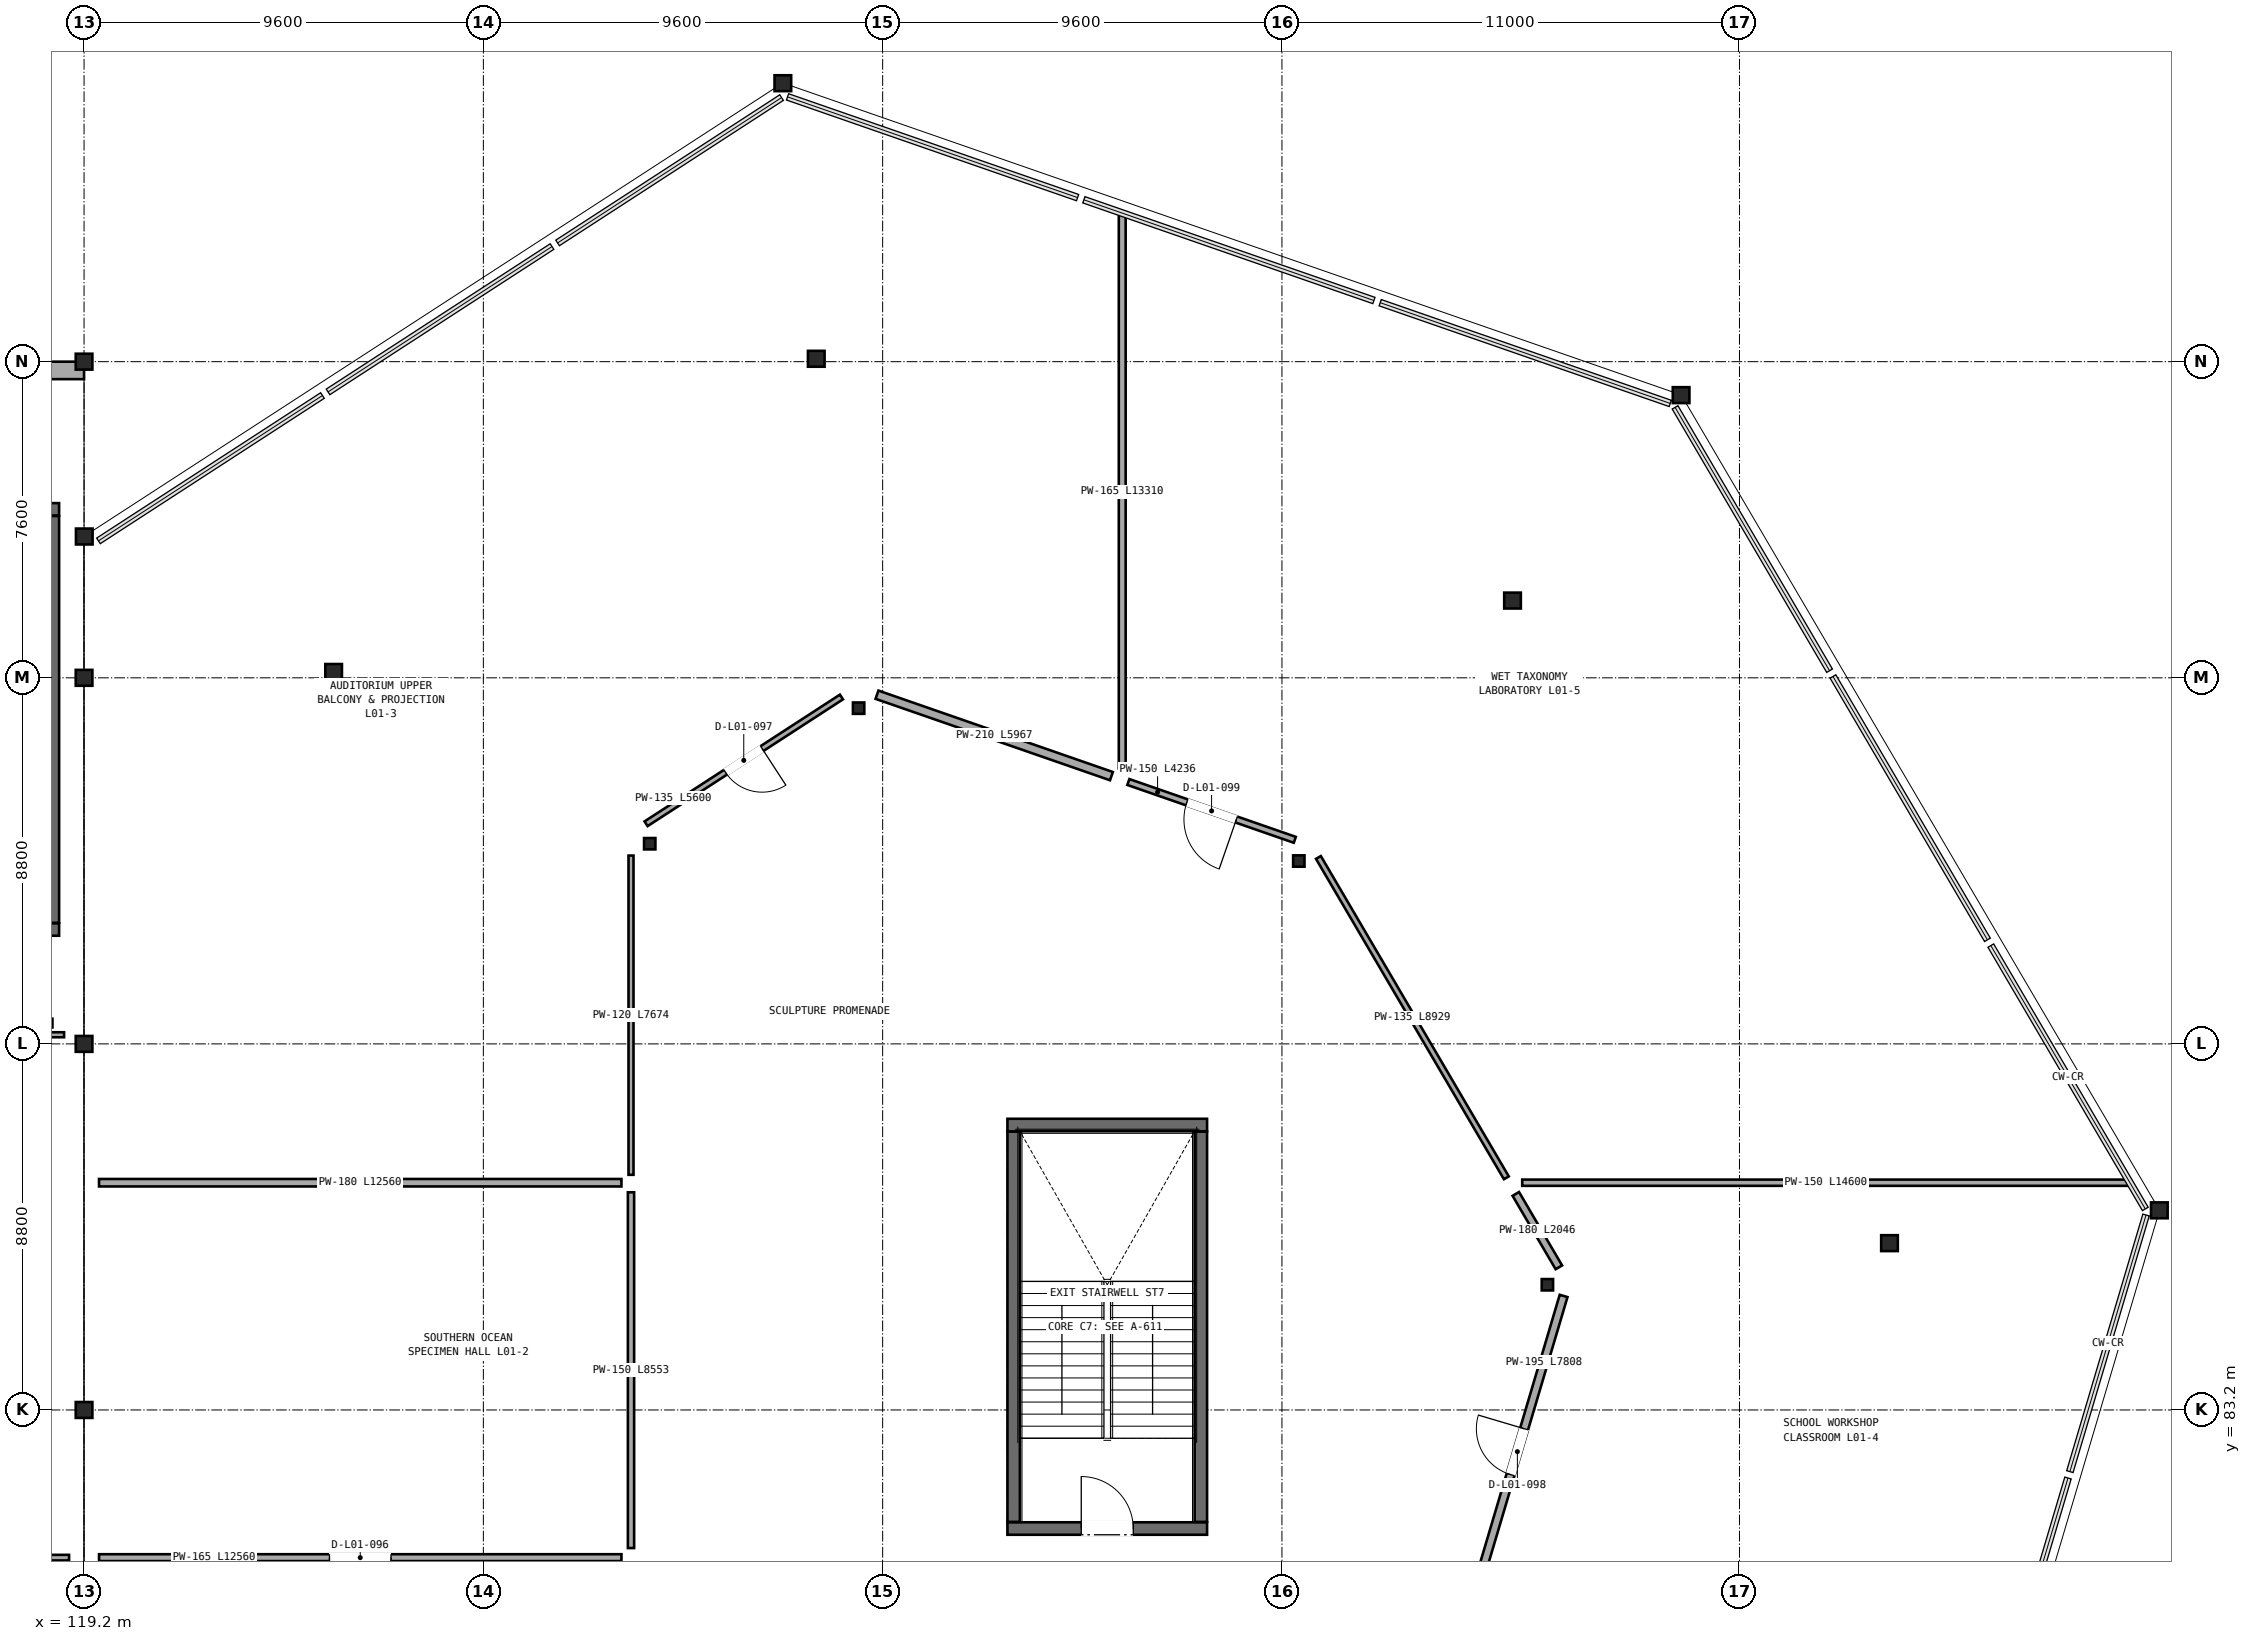
"""IFC4 building model, lengths in metres.
Left out: names, types, materials, properties, quantities, classifications, styles, units other than length and angle.
Written with IfcOpenShell. Run it as: python <this file> out.ifc"""

import sys

from ifc_helpers import new_model, si_unit, direction, frame, frame_2d, origin, origin_2d, place, context, subcontext, project, spatial, rectangle, hollow_circle, i_section, extrude, element, fill, save


model = new_model("IFC4")
c1 = context("Model", 3, precision=1e-05, world=origin(), true_north=direction((0.0, 1.0)))
c2 = subcontext(c1, "Body", "Model", "MODEL_VIEW")
j1 = project(units=[si_unit("LENGTHUNIT", "METRE"), si_unit("PLANEANGLEUNIT", "RADIAN")], contexts=[c1])
p1 = place(None, origin())
s1 = spatial("IfcSite", under=j1, at=p1, CompositionType="ELEMENT")
p2 = place(p1, origin())
s2 = spatial("IfcBuilding", under=s1, at=p2, CompositionType="ELEMENT")
p3 = place(p2, frame((0.0, 0.0, 5.6)))
s3 = spatial("IfcBuildingStorey", under=s2, at=p3, CompositionType="ELEMENT", Elevation=5.6)
for number, where, z_axis, x_axis in (
    (1, (119.2, 83.2, 0.0), (0.0, 0.0, 1.0), (1.0, 0.0, 0.0)),
    (2, (119.2, 92.0, 0.0), (0.0, 0.0, 1.0), (1.0, 0.0, 0.0)),
    (3, (119.2, 100.8, 0.0), (0.0, 0.0, 1.0), (1.0, 0.0, 0.0)),
    (4, (119.2, 108.4, 0.0), (0.0, 0.0, 1.0), (1.0, 0.0, 0.0)),
):
    element("IfcColumn", number, at=place(p3, frame(where, z_axis=z_axis, x_axis=x_axis)), inside=s3, PredefinedType="COLUMN", context=c2, shape_type="SweptSolid", body=[
        extrude(i_section(OverallWidth=0.4, OverallDepth=0.382, WebThickness=0.025, FlangeThickness=0.036, at=origin_2d()), origin(), (0.0, 0.0, 1.0), 4.5),
    ])
p4 = place(p3, frame((169.094, 87.999, 0.04), z_axis=(-0.140983406199, -0.017121735726, 0.989863892332), x_axis=(0.120559238504, -0.992706134771, 0.0)))
e5 = element("IfcColumn", 5, at=p4, inside=s3, PredefinedType="COLUMN", context=c2, shape_type="SweptSolid", body=[
    extrude(i_section(OverallWidth=0.4, OverallDepth=0.382, WebThickness=0.025, FlangeThickness=0.036, at=origin_2d()), origin(), (0.0, 0.0, 1.0), 4.506),
])
p5 = place(p3, frame((162.607, 87.21, 0.0), z_axis=(0.0, 0.0, 1.0), x_axis=(1.0, 0.0, 0.0)))
e6 = element("IfcColumn", 6, at=p5, inside=s3, PredefinedType="COLUMN", context=c2, shape_type="SweptSolid", body=[
    extrude(i_section(OverallWidth=0.4, OverallDepth=0.382, WebThickness=0.025, FlangeThickness=0.036, at=origin_2d()), origin(), (0.0, 0.0, 1.0), 4.5),
])
p6 = place(p3, frame((154.382, 86.21, 0.0), z_axis=(0.0, 0.0, 1.0), x_axis=(1.0, 0.0, 0.0)))
e7 = element("IfcColumn", 7, at=p6, inside=s3, PredefinedType="COLUMN", context=c2, shape_type="SweptSolid", body=[
    extrude(hollow_circle(Radius=0.136, WallThickness=0.009, at=origin_2d()), origin(), (0.0, 0.0, 1.0), 4.5),
])
p7 = place(p3, frame((157.596, 107.596, 0.04), z_axis=(-0.088140167432, -0.10738356192, 0.990303025096), x_axis=(0.772965424746, -0.634448147722, 0.0)))
e8 = element("IfcColumn", 8, at=p7, inside=s3, PredefinedType="COLUMN", context=c2, shape_type="SweptSolid", body=[
    extrude(i_section(OverallWidth=0.4, OverallDepth=0.382, WebThickness=0.025, FlangeThickness=0.036, at=origin_2d()), origin(), (0.0, 0.0, 1.0), 4.504),
])
p8 = place(p3, frame((153.544, 102.657, 0.0), z_axis=(0.0, 0.0, 1.0), x_axis=(1.0, 0.0, 0.0)))
e9 = element("IfcColumn", 9, at=p8, inside=s3, PredefinedType="COLUMN", context=c2, shape_type="SweptSolid", body=[
    extrude(i_section(OverallWidth=0.4, OverallDepth=0.382, WebThickness=0.025, FlangeThickness=0.036, at=origin_2d()), origin(), (0.0, 0.0, 1.0), 4.5),
])
p9 = place(p3, frame((148.406, 96.396, 0.0), z_axis=(0.0, 0.0, 1.0), x_axis=(1.0, 0.0, 0.0)))
e10 = element("IfcColumn", 10, at=p9, inside=s3, PredefinedType="COLUMN", context=c2, shape_type="SweptSolid", body=[
    extrude(hollow_circle(Radius=0.136, WallThickness=0.009, at=origin_2d()), origin(), (0.0, 0.0, 1.0), 4.5),
])
p10 = place(p3, frame((136.001, 115.094, 0.04), z_axis=(0.017439331242, -0.14390156245, 0.989438330595), x_axis=(0.992736486801, 0.120309051091, 0.0)))
e11 = element("IfcColumn", 11, at=p10, inside=s3, PredefinedType="COLUMN", context=c2, shape_type="SweptSolid", body=[
    extrude(i_section(OverallWidth=0.4, OverallDepth=0.382, WebThickness=0.025, FlangeThickness=0.036, at=origin_2d()), origin(), (0.0, 0.0, 1.0), 4.508),
])
p11 = place(p3, frame((136.804, 108.469, 0.0), z_axis=(0.0, 0.0, 1.0), x_axis=(1.0, 0.0, 0.0)))
e12 = element("IfcColumn", 12, at=p11, inside=s3, PredefinedType="COLUMN", context=c2, shape_type="SweptSolid", body=[
    extrude(i_section(OverallWidth=0.4, OverallDepth=0.382, WebThickness=0.025, FlangeThickness=0.036, at=origin_2d()), origin(), (0.0, 0.0, 1.0), 4.5),
])
p12 = place(p3, frame((137.823, 100.071, 0.0), z_axis=(0.0, 0.0, 1.0), x_axis=(1.0, 0.0, 0.0)))
e13 = element("IfcColumn", 13, at=p12, inside=s3, PredefinedType="COLUMN", context=c2, shape_type="SweptSolid", body=[
    extrude(hollow_circle(Radius=0.136, WallThickness=0.009, at=origin_2d()), origin(), (0.0, 0.0, 1.0), 4.5),
])
p13 = place(p3, frame((119.205, 104.197, 0.04), z_axis=(0.130191095682, -0.070698366304, 0.988965125577), x_axis=(0.477212813724, 0.878787761873, 0.0)))
e14 = element("IfcColumn", 14, at=p13, inside=s3, PredefinedType="COLUMN", context=c2, shape_type="SweptSolid", body=[
    extrude(i_section(OverallWidth=0.4, OverallDepth=0.382, WebThickness=0.025, FlangeThickness=0.036, at=origin_2d()), origin(), (0.0, 0.0, 1.0), 4.51),
])
p14 = place(p3, frame((125.2, 100.941, 0.0), z_axis=(0.0, 0.0, 1.0), x_axis=(1.0, 0.0, 0.0)))
e15 = element("IfcColumn", 15, at=p14, inside=s3, PredefinedType="COLUMN", context=c2, shape_type="SweptSolid", body=[
    extrude(i_section(OverallWidth=0.4, OverallDepth=0.382, WebThickness=0.025, FlangeThickness=0.036, at=origin_2d()), origin(), (0.0, 0.0, 1.0), 4.5),
])
p15 = place(p3, frame((132.8, 96.812, 0.0), z_axis=(0.0, 0.0, 1.0), x_axis=(1.0, 0.0, 0.0)))
e16 = element("IfcColumn", 16, at=p15, inside=s3, PredefinedType="COLUMN", context=c2, shape_type="SweptSolid", body=[
    extrude(hollow_circle(Radius=0.136, WallThickness=0.009, at=origin_2d()), origin(), (0.0, 0.0, 1.0), 4.5),
])
p16 = place(p3, frame((119.2, 108.19, 0.0), z_axis=(0.0, 0.0, 1.0), x_axis=(-1.0, 0.0, 0.0)))
e17 = element("IfcWall", 17, at=p16, inside=s3, PredefinedType="SOLIDWALL", context=c2, shape_type="SweptSolid", body=[
    extrude(rectangle(XDim=1.6, YDim=0.42, at=frame_2d((0.8, 0.0))), origin(), (0.0, 0.0, 1.0), 3.628),
])
p17 = place(p3, frame((110.2, 94.75, 0.0), z_axis=(0.0, 0.0, 1.0), x_axis=(1.0, 0.0, 0.0)))
e18 = element("IfcWall", 18, at=p17, inside=s3, PredefinedType="SHEAR", context=c2, shape_type="SweptSolid", body=[
    extrude(rectangle(XDim=8.4, YDim=0.3, at=frame_2d((4.2, 0.0))), origin(), (0.0, 0.0, 1.0), 4.245),
])
p18 = place(p17, frame((5.925, 0.0, 0.0)))
e19 = element("IfcOpeningElement", 19, at=p18, cuts=e18, PredefinedType="OPENING", context=c2, shape_type="SweptSolid", body=[
    extrude(rectangle(XDim=1.45, YDim=2.25, at=frame_2d((0.725, 1.125))), frame((0.0, 0.16, 0.0), z_axis=(0.0, -1.0, 0.0), x_axis=(1.0, 0.0, 0.0)), (0.0, 0.0, 1.0), 0.32),
])
p19 = place(p3, frame((118.6, 104.85, 0.0), z_axis=(0.0, 0.0, 1.0), x_axis=(-1.0, 0.0, 0.0)))
e20 = element("IfcWall", 20, at=p19, inside=s3, PredefinedType="SHEAR", context=c2, shape_type="SweptSolid", body=[
    extrude(rectangle(XDim=8.4, YDim=0.3, at=frame_2d((4.2, 0.0))), origin(), (0.0, 0.0, 1.0), 4.245),
])
p20 = place(p3, frame((118.45, 94.91, 0.0), z_axis=(0.0, 0.0, 1.0), x_axis=(0.0, 1.0, 0.0)))
e21 = element("IfcWall", 21, at=p20, inside=s3, PredefinedType="SHEAR", context=c2, shape_type="SweptSolid", body=[
    extrude(rectangle(XDim=9.78, YDim=0.3, at=frame_2d((4.89, 0.0))), origin(), (0.0, 0.0, 1.0), 4.245),
])
p21 = place(p3, frame((141.4, 80.35, 0.0), z_axis=(0.0, 0.0, 1.0), x_axis=(1.0, 0.0, 0.0)))
e22 = element("IfcWall", 22, at=p21, inside=s3, PredefinedType="SHEAR", context=c2, shape_type="SweptSolid", body=[
    extrude(rectangle(XDim=4.8, YDim=0.3, at=frame_2d((2.4, 0.0))), origin(), (0.0, 0.0, 1.0), 4.235),
])
p22 = place(p21, frame((1.775, 0.0, 0.0)))
e23 = element("IfcOpeningElement", 23, at=p22, cuts=e22, PredefinedType="OPENING", context=c2, shape_type="SweptSolid", body=[
    extrude(rectangle(XDim=1.25, YDim=2.2, at=frame_2d((0.625, 1.1))), frame((0.0, 0.16, 0.0), z_axis=(0.0, -1.0, 0.0), x_axis=(1.0, 0.0, 0.0)), (0.0, 0.0, 1.0), 0.32),
])
p23 = place(p3, frame((146.2, 90.05, 0.0), z_axis=(0.0, 0.0, 1.0), x_axis=(-1.0, 0.0, 0.0)))
e24 = element("IfcWall", 24, at=p23, inside=s3, PredefinedType="SHEAR", context=c2, shape_type="SweptSolid", body=[
    extrude(rectangle(XDim=4.8, YDim=0.3, at=frame_2d((2.4, 0.0))), origin(), (0.0, 0.0, 1.0), 4.235),
])
for number, where, z_axis, x_axis in (
    (25, (146.05, 80.51, 0.0), (0.0, 0.0, 1.0), (0.0, 1.0, 0.0)),
    (26, (141.55, 89.89, 0.0), (0.0, 0.0, 1.0), (0.0, -1.0, 0.0)),
):
    element("IfcWall", number, at=place(p3, frame(where, z_axis=z_axis, x_axis=x_axis)), inside=s3, PredefinedType="SHEAR", context=c2, shape_type="SweptSolid", body=[
        extrude(rectangle(XDim=9.38, YDim=0.3, at=frame_2d((4.69, 0.0))), origin(), (0.0, 0.0, 1.0), 4.235),
    ])
p24 = place(p3, frame((132.12, 79.65, 0.0), z_axis=(0.0, 0.0, 1.0), x_axis=(-1.0, 0.0, 0.0)))
e27 = element("IfcWall", 27, at=p24, inside=s3, PredefinedType="PARTITIONING", context=c2, shape_type="SweptSolid", body=[
    extrude(rectangle(XDim=12.56, YDim=0.165, at=frame_2d((6.28, 0.0))), origin(), (0.0, 0.0, 1.0), 3.51),
])
p25 = place(p24, frame((5.54, 0.0, 0.0)))
e28 = element("IfcOpeningElement", 28, at=p25, cuts=e27, PredefinedType="OPENING", context=c2, shape_type="SweptSolid", body=[
    extrude(rectangle(XDim=1.48, YDim=2.24, at=frame_2d((0.74, 1.12))), frame((0.0, 0.093, 0.0), z_axis=(0.0, -1.0, 0.0), x_axis=(1.0, 0.0, 0.0)), (0.0, 0.0, 1.0), 0.185),
])
p26 = place(p3, frame((132.35, 88.433, 0.0), z_axis=(0.0, 0.0, 1.0), x_axis=(0.0, -1.0, 0.0)))
e29 = element("IfcWall", 29, at=p26, inside=s3, PredefinedType="PARTITIONING", context=c2, shape_type="SweptSolid", body=[
    extrude(rectangle(XDim=8.553, YDim=0.15, at=frame_2d((4.276, 0.0))), origin(), (0.0, 0.0, 1.0), 4.13),
])
p27 = place(p3, frame((137.409, 100.339, 0.0), z_axis=(0.0, 0.0, 1.0), x_axis=(-0.838914477988, -0.544263262238, 0.0)))
e30 = element("IfcWall", 30, at=p27, inside=s3, PredefinedType="PARTITIONING", context=c2, shape_type="SweptSolid", body=[
    extrude(rectangle(XDim=5.6, YDim=0.135, at=frame_2d((2.8, 0.0))), origin(), (0.0, 0.0, 1.0), 4.13),
])
p28 = place(p27, frame((2.275, 0.0, 0.0)))
e31 = element("IfcOpeningElement", 31, at=p28, cuts=e30, PredefinedType="OPENING", context=c2, shape_type="SweptSolid", body=[
    extrude(rectangle(XDim=1.05, YDim=2.34, at=frame_2d((0.525, 1.17))), frame((0.0, 0.078, 0.0), z_axis=(0.0, -1.0, 0.0), x_axis=(1.0, 0.0, 0.0)), (0.0, 0.0, 1.0), 0.155),
])
p29 = place(p3, frame((132.35, 96.527, 0.0), z_axis=(0.0, 0.0, 1.0), x_axis=(0.0, -1.0, 0.0)))
e32 = element("IfcWall", 32, at=p29, inside=s3, PredefinedType="PARTITIONING", context=c2, shape_type="SweptSolid", body=[
    extrude(rectangle(XDim=7.675, YDim=0.12, at=frame_2d((3.837, 0.0))), origin(), (0.0, 0.0, 1.0), 4.13),
])
p30 = place(p3, frame((143.901, 98.437, 0.0), z_axis=(0.0, 0.0, 1.0), x_axis=(-0.944669438021, 0.328023860214, 0.0)))
e33 = element("IfcWall", 33, at=p30, inside=s3, PredefinedType="PARTITIONING", context=c2, shape_type="SweptSolid", body=[
    extrude(rectangle(XDim=5.967, YDim=0.21, at=frame_2d((2.983, 0.0))), origin(), (0.0, 0.0, 1.0), 4.13),
])
p31 = place(p3, frame((152.549, 78.456, 0.0), z_axis=(0.0, 0.0, 1.0), x_axis=(0.284584370511, 0.958650998049, 0.0)))
e34 = element("IfcWall", 34, at=p31, inside=s3, PredefinedType="PARTITIONING", context=c2, shape_type="SweptSolid", body=[
    extrude(rectangle(XDim=7.808, YDim=0.195, at=frame_2d((3.904, 0.0))), origin(), (0.0, 0.0, 1.0), 3.41),
])
p32 = place(p31, frame((3.329, 0.0, 0.0)))
e35 = element("IfcOpeningElement", 35, at=p32, cuts=e34, PredefinedType="OPENING", context=c2, shape_type="SweptSolid", body=[
    extrude(rectangle(XDim=1.15, YDim=2.34, at=frame_2d((0.575, 1.17))), frame((0.0, 0.107, 0.0), z_axis=(0.0, -1.0, 0.0), x_axis=(1.0, 0.0, 0.0)), (0.0, 0.0, 1.0), 0.215),
])
p33 = place(p3, frame((154.658, 86.629, 0.0), z_axis=(0.0, 0.0, 1.0), x_axis=(-0.506013427862, 0.862525600097, 0.0)))
e36 = element("IfcWall", 36, at=p33, inside=s3, PredefinedType="PARTITIONING", context=c2, shape_type="SweptSolid", body=[
    extrude(rectangle(XDim=2.046, YDim=0.18, at=frame_2d((1.023, 0.0))), origin(), (0.0, 0.0, 1.0), 4.13),
])
p34 = place(p3, frame((148.309, 96.906, 0.0), z_axis=(0.0, 0.0, 1.0), x_axis=(-0.944667711612, 0.328028832022, 0.0)))
e37 = element("IfcWall", 37, at=p34, inside=s3, PredefinedType="PARTITIONING", context=c2, shape_type="SweptSolid", body=[
    extrude(rectangle(XDim=4.236, YDim=0.15, at=frame_2d((2.118, 0.0))), origin(), (0.0, 0.0, 1.0), 4.13),
])
p35 = place(p34, frame((1.488, 0.0, 0.0)))
e38 = element("IfcOpeningElement", 38, at=p35, cuts=e37, PredefinedType="OPENING", context=c2, shape_type="SweptSolid", body=[
    extrude(rectangle(XDim=1.26, YDim=2.34, at=frame_2d((0.63, 1.17))), frame((0.0, 0.085, 0.0), z_axis=(0.0, -1.0, 0.0), x_axis=(1.0, 0.0, 0.0)), (0.0, 0.0, 1.0), 0.17),
])
p36 = place(p3, frame((153.396, 88.781, 0.0), z_axis=(0.0, 0.0, 1.0), x_axis=(-0.506050684721, 0.862503741727, 0.0)))
e39 = element("IfcWall", 39, at=p36, inside=s3, PredefinedType="PARTITIONING", context=c2, shape_type="SweptSolid", body=[
    extrude(rectangle(XDim=8.928, YDim=0.135, at=frame_2d((4.464, 0.0))), origin(), (0.0, 0.0, 1.0), 3.41),
])
p37 = place(p3, frame((118.72, 92.22, 0.0), z_axis=(0.0, 0.0, 1.0), x_axis=(-1.0, 0.0, 0.0)))
e40 = element("IfcWall", 40, at=p37, inside=s3, PredefinedType="PARTITIONING", context=c2, shape_type="SweptSolid", body=[
    extrude(rectangle(XDim=8.64, YDim=0.12, at=frame_2d((4.32, 0.0))), origin(), (0.0, 0.0, 1.0), 3.613),
])
p38 = place(p3, frame((118.84, 79.65, 0.0), z_axis=(0.0, 0.0, 1.0), x_axis=(-1.0, 0.0, 0.0)))
e41 = element("IfcWall", 41, at=p38, inside=s3, PredefinedType="PARTITIONING", context=c2, shape_type="SweptSolid", body=[
    extrude(rectangle(XDim=9.61, YDim=0.135, at=frame_2d((4.805, 0.0))), origin(), (0.0, 0.0, 1.0), 3.763),
])
p39 = place(p3, frame((119.56, 88.663, 0.0), z_axis=(0.0, 0.0, 1.0), x_axis=(1.0, 0.0, 0.0)))
e42 = element("IfcWall", 42, at=p39, inside=s3, PredefinedType="PARTITIONING", context=c2, shape_type="SweptSolid", body=[
    extrude(rectangle(XDim=12.56, YDim=0.18, at=frame_2d((6.28, 0.0))), origin(), (0.0, 0.0, 1.0), 3.51),
])
p40 = place(p3, frame((144.16, 111.931, 0.0), z_axis=(0.0, 0.0, 1.0), x_axis=(0.0, -1.0, 0.0)))
e43 = element("IfcWall", 43, at=p40, inside=s3, PredefinedType="PARTITIONING", context=c2, shape_type="SweptSolid", body=[
    extrude(rectangle(XDim=13.31, YDim=0.165, at=frame_2d((6.655, 0.0))), origin(), (0.0, 0.0, 1.0), 2.75),
])
p41 = place(p3, frame((153.777, 88.663, 0.0), z_axis=(0.0, 0.0, 1.0), x_axis=(1.0, 0.0, 0.0)))
e44 = element("IfcWall", 44, at=p41, inside=s3, PredefinedType="PARTITIONING", context=c2, shape_type="SweptSolid", body=[
    extrude(rectangle(XDim=14.6, YDim=0.15, at=frame_2d((7.3, 0.0))), origin(), (0.0, 0.0, 1.0), 2.75),
])
p42 = place(p22, origin())
e45 = element("IfcDoor", 45, at=p42, inside=s3, OperationType="SINGLE_SWING_LEFT", PredefinedType="DOOR", context=c2, shape_type="SweptSolid", body=[
    extrude(rectangle(XDim=1.25, YDim=2.2, at=frame_2d((0.625, 1.1))), frame((0.0, 0.025, 0.0), z_axis=(0.0, -1.0, 0.0), x_axis=(1.0, 0.0, 0.0)), (0.0, 0.0, 1.0), 0.05),
])
fill(e23, e45)
p43 = place(p25, origin())
e46 = element("IfcDoor", 46, at=p43, inside=s3, OperationType="SINGLE_SWING_RIGHT", PredefinedType="DOOR", context=c2, shape_type="SweptSolid", body=[
    extrude(rectangle(XDim=1.48, YDim=2.24, at=frame_2d((0.74, 1.12))), frame((0.0, 0.025, 0.0), z_axis=(0.0, -1.0, 0.0), x_axis=(1.0, 0.0, 0.0)), (0.0, 0.0, 1.0), 0.05),
])
fill(e28, e46)
p44 = place(p28, origin())
e47 = element("IfcDoor", 47, at=p44, inside=s3, OperationType="SINGLE_SWING_LEFT", PredefinedType="DOOR", context=c2, shape_type="SweptSolid", body=[
    extrude(rectangle(XDim=1.05, YDim=2.34, at=frame_2d((0.525, 1.17))), frame((0.0, 0.025, 0.0), z_axis=(0.0, -1.0, 0.0), x_axis=(1.0, 0.0, 0.0)), (0.0, 0.0, 1.0), 0.05),
])
fill(e31, e47)
p45 = place(p32, origin())
e48 = element("IfcDoor", 48, at=p45, inside=s3, OperationType="SINGLE_SWING_RIGHT", PredefinedType="DOOR", context=c2, shape_type="SweptSolid", body=[
    extrude(rectangle(XDim=1.15, YDim=2.34, at=frame_2d((0.575, 1.17))), frame((0.0, 0.025, 0.0), z_axis=(0.0, -1.0, 0.0), x_axis=(1.0, 0.0, 0.0)), (0.0, 0.0, 1.0), 0.05),
])
fill(e35, e48)
p46 = place(p35, origin())
e49 = element("IfcDoor", 49, at=p46, inside=s3, OperationType="SINGLE_SWING_LEFT", PredefinedType="DOOR", context=c2, shape_type="SweptSolid", body=[
    extrude(rectangle(XDim=1.26, YDim=2.34, at=frame_2d((0.63, 1.17))), frame((0.0, 0.025, 0.0), z_axis=(0.0, -1.0, 0.0), x_axis=(1.0, 0.0, 0.0)), (0.0, 0.0, 1.0), 0.05),
])
fill(e38, e49)
save(model, sys.argv[1])
